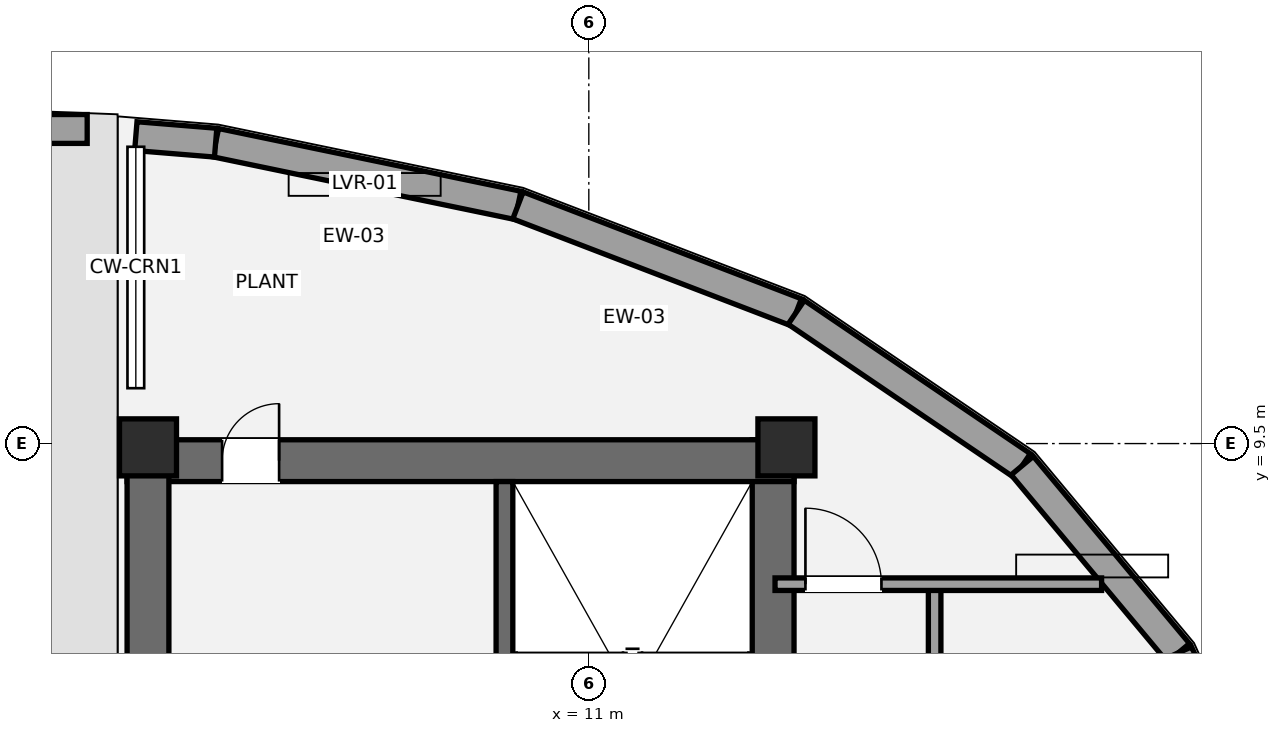
"""IFC4 building model, lengths in metres.
Left out: names, types, materials, properties, quantities, classifications, styles, units other than length and angle.
Written with IfcOpenShell. Run it as: python <this file> out.ifc"""

import sys

from ifc_helpers import new_model, si_unit, direction, frame, frame_2d, origin, origin_2d, place, context, subcontext, project, spatial, rectangle, extrude, element, fill, save


model = new_model("IFC4")
c1 = context("Model", 3, precision=1e-05, world=origin(), true_north=direction((0.0, 1.0)))
c2 = subcontext(c1, "Body", "Model", "MODEL_VIEW")
j1 = project(units=[si_unit("LENGTHUNIT", "METRE"), si_unit("PLANEANGLEUNIT", "RADIAN")], contexts=[c1])
p1 = place(None, origin())
s1 = spatial("IfcSite", under=j1, at=p1, CompositionType="ELEMENT")
p2 = place(p1, origin())
s2 = spatial("IfcBuilding", under=s1, at=p2, CompositionType="ELEMENT")
p3 = place(p2, frame((0.0, 0.0, 269.2)))
s3 = spatial("IfcBuildingStorey", under=s2, at=p3, CompositionType="ELEMENT", Elevation=269.2)
p4 = place(p3, frame((13.425, 1.3, 0.0), z_axis=(0.0, 0.0, 1.0), x_axis=(0.0, 1.0, 0.0)))
e1 = element("IfcWall", 1, at=p4, inside=s3, PredefinedType="SHEAR", context=c2, shape_type="SweptSolid", body=[
    extrude(rectangle(XDim=8.25, YDim=0.55, at=frame_2d((4.125, 0.0))), origin(), (0.0, 0.0, 1.0), 3.8),
])
p5 = place(p3, frame((4.925, 9.275, 0.0), z_axis=(0.0, 0.0, 1.0), x_axis=(1.0, 0.0, 0.0)))
e2 = element("IfcWall", 2, at=p5, inside=s3, PredefinedType="SHEAR", context=c2, shape_type="SweptSolid", body=[
    extrude(rectangle(XDim=8.775, YDim=0.55, at=frame_2d((4.387, 0.0))), origin(), (0.0, 0.0, 1.0), 3.8),
])
p6 = place(p5, frame((1.25, 0.0, 0.0)))
e3 = element("IfcOpeningElement", 3, at=p6, cuts=e2, PredefinedType="OPENING", context=c2, shape_type="SweptSolid", body=[
    extrude(rectangle(XDim=0.75, YDim=2.1, at=frame_2d((0.375, 1.05))), frame((0.0, 0.285, 0.0), z_axis=(0.0, -1.0, 0.0), x_axis=(1.0, 0.0, 0.0)), (0.0, 0.0, 1.0), 0.57),
])
p7 = place(p3, frame((5.2, 1.3, 0.0), z_axis=(0.0, 0.0, 1.0), x_axis=(0.0, 1.0, 0.0)))
e4 = element("IfcWall", 4, at=p7, inside=s3, PredefinedType="SHEAR", context=c2, shape_type="SweptSolid", body=[
    extrude(rectangle(XDim=8.25, YDim=0.55, at=frame_2d((4.125, 0.0))), origin(), (0.0, 0.0, 1.0), 3.8),
])
p8 = place(p3, frame((9.89, 1.85, 0.0), z_axis=(0.0, 0.0, 1.0), x_axis=(0.0, 1.0, 0.0)))
e5 = element("IfcWall", 5, at=p8, inside=s3, PredefinedType="SHEAR", context=c2, shape_type="SweptSolid", body=[
    extrude(rectangle(XDim=7.15, YDim=0.22, at=frame_2d((3.575, 0.0))), origin(), (0.0, 0.0, 1.0), 3.8),
])
for number, where, z_axis, x_axis in (
    (6, (5.2, 9.45, 0.0), (0.0, 0.0, 1.0), (1.0, 0.0, 0.0)),
    (7, (13.6, 9.45, 0.0), (0.0, 0.0, 1.0), (1.0, 0.0, 0.0)),
):
    element("IfcColumn", number, at=place(p3, frame(where, z_axis=z_axis, x_axis=x_axis)), inside=s3, PredefinedType="PILASTER", context=c2, shape_type="SweptSolid", body=[
        extrude(rectangle(XDim=0.75, YDim=0.75, at=origin_2d()), origin(), (0.0, 0.0, 1.0), 3.8),
    ])
p9 = place(p3, frame((10.068, 12.634, 0.0), z_axis=(0.0, 0.0, 1.0), x_axis=(-0.97915503901, 0.203114277148, 0.0)))
e8 = element("IfcWall", 8, at=p9, inside=s3, PredefinedType="ELEMENTEDWALL", context=c2, shape_type="SweptSolid", body=[
    extrude(rectangle(XDim=4.063, YDim=0.38, at=frame_2d((2.031, 0.0))), origin(), (0.0, 0.0, 1.0), 2.97),
])
p10 = place(p3, frame((13.729, 11.227, 0.0), z_axis=(0.0, 0.0, 1.0), x_axis=(-0.933505951982, 0.358561902068, 0.0)))
e9 = element("IfcWall", 9, at=p10, inside=s3, PredefinedType="ELEMENTEDWALL", context=c2, shape_type="SweptSolid", body=[
    extrude(rectangle(XDim=3.922, YDim=0.38, at=frame_2d((1.961, 0.0))), origin(), (0.0, 0.0, 1.0), 2.97),
])
p11 = place(p3, frame((16.703, 9.21, 0.0), z_axis=(0.0, 0.0, 1.0), x_axis=(-0.827549057152, 0.56139340752, 0.0)))
e10 = element("IfcWall", 10, at=p11, inside=s3, PredefinedType="ELEMENTEDWALL", context=c2, shape_type="SweptSolid", body=[
    extrude(rectangle(XDim=3.593, YDim=0.38, at=frame_2d((1.796, 0.0))), origin(), (0.0, 0.0, 1.0), 2.97),
])
p12 = place(p3, frame((18.758, 6.748, 0.0), z_axis=(0.0, 0.0, 1.0), x_axis=(-0.640685893821, 0.76780309029, 0.0)))
e11 = element("IfcWall", 11, at=p12, inside=s3, PredefinedType="ELEMENTEDWALL", context=c2, shape_type="SweptSolid", body=[
    extrude(rectangle(XDim=3.207, YDim=0.38, at=frame_2d((1.604, 0.0))), origin(), (0.0, 0.0, 1.0), 2.97),
])
p13 = place(p3, frame((19.959, 4.083, 0.0), z_axis=(0.0, 0.0, 1.0), x_axis=(-0.411031522025, 0.911621131777, 0.0)))
e12 = element("IfcWall", 12, at=p13, inside=s3, PredefinedType="ELEMENTEDWALL", context=c2, shape_type="SweptSolid", body=[
    extrude(rectangle(XDim=2.922, YDim=0.38, at=frame_2d((1.461, 0.0))), origin(), (0.0, 0.0, 1.0), 2.97),
])
p14 = place(p3, frame((6.09, 13.459, 0.0), z_axis=(0.0, 0.0, 1.0), x_axis=(-0.99666772043, 0.081568713692, 0.0)))
e13 = element("IfcWall", 13, at=p14, inside=s3, PredefinedType="ELEMENTEDWALL", context=c2, shape_type="SweptSolid", body=[
    extrude(rectangle(XDim=1.053, YDim=0.38, at=frame_2d((0.527, 0.0))), origin(), (0.0, 0.0, 1.0), 2.97),
])
p15 = place(p3, frame((4.4, 13.639, 0.0), z_axis=(0.0, 0.0, 1.0), x_axis=(-1.0, 0.0, 0.0)))
e14 = element("IfcWall", 14, at=p15, inside=s3, PredefinedType="PARAPET", context=c2, shape_type="SweptSolid", body=[
    extrude(rectangle(XDim=8.8, YDim=0.38, at=frame_2d((4.4, 0.0))), origin(), (0.0, 0.0, 1.0), 1.15),
])
p16 = place(p3, frame((15.55, -7.05, 0.0), z_axis=(0.0, 0.0, 1.0), x_axis=(0.0, 1.0, 0.0)))
e15 = element("IfcWall", 15, at=p16, inside=s3, PredefinedType="PARTITIONING", context=c2, shape_type="SweptSolid", body=[
    extrude(rectangle(XDim=14.7, YDim=0.165, at=frame_2d((7.35, 0.0))), origin(), (0.0, 0.0, 1.0), 2.987),
])
p17 = place(p16, frame((3.04, 0.0, 0.0)))
e16 = element("IfcOpeningElement", 16, at=p17, cuts=e15, PredefinedType="OPENING", context=c2, shape_type="SweptSolid", body=[
    extrude(rectangle(XDim=1.0, YDim=2.15, at=frame_2d((0.5, 1.075))), frame((0.0, 0.093, 0.0), z_axis=(0.0, -1.0, 0.0), x_axis=(1.0, 0.0, 0.0)), (0.0, 0.0, 1.0), 0.185),
])
p18 = place(p16, frame((10.2, 0.0, 0.0)))
e17 = element("IfcOpeningElement", 17, at=p18, cuts=e15, PredefinedType="OPENING", context=c2, shape_type="SweptSolid", body=[
    extrude(rectangle(XDim=1.0, YDim=2.15, at=frame_2d((0.5, 1.075))), frame((0.0, 0.093, 0.0), z_axis=(0.0, -1.0, 0.0), x_axis=(1.0, 0.0, 0.0)), (0.0, 0.0, 1.0), 0.185),
])
p19 = place(p3, frame((13.45, 7.65, 0.0), z_axis=(0.0, 0.0, 1.0), x_axis=(1.0, 0.0, 0.0)))
e18 = element("IfcWall", 18, at=p19, inside=s3, PredefinedType="PARTITIONING", context=c2, shape_type="SweptSolid", body=[
    extrude(rectangle(XDim=4.297, YDim=0.165, at=frame_2d((2.148, 0.0))), origin(), (0.0, 0.0, 1.0), 2.968),
])
p20 = place(p19, frame((0.4, 0.0, 0.0)))
e19 = element("IfcOpeningElement", 19, at=p20, cuts=e18, PredefinedType="OPENING", context=c2, shape_type="SweptSolid", body=[
    extrude(rectangle(XDim=1.0, YDim=2.15, at=frame_2d((0.5, 1.075))), frame((0.0, 0.093, 0.0), z_axis=(0.0, -1.0, 0.0), x_axis=(1.0, 0.0, 0.0)), (0.0, 0.0, 1.0), 0.185),
])
p21 = place(p6, origin())
e20 = element("IfcDoor", 20, at=p21, inside=s3, OperationType="SINGLE_SWING_RIGHT", PredefinedType="DOOR", context=c2, shape_type="SweptSolid", body=[
    extrude(rectangle(XDim=0.75, YDim=2.1, at=frame_2d((0.375, 1.05))), frame((0.0, 0.025, 0.0), z_axis=(0.0, -1.0, 0.0), x_axis=(1.0, 0.0, 0.0)), (0.0, 0.0, 1.0), 0.05),
])
fill(e3, e20)
p22 = place(p20, origin())
e21 = element("IfcDoor", 21, at=p22, inside=s3, OperationType="SINGLE_SWING_LEFT", PredefinedType="DOOR", context=c2, shape_type="SweptSolid", body=[
    extrude(rectangle(XDim=1.0, YDim=2.15, at=frame_2d((0.5, 1.075))), frame((0.0, 0.025, 0.0), z_axis=(0.0, -1.0, 0.0), x_axis=(1.0, 0.0, 0.0)), (0.0, 0.0, 1.0), 0.05),
])
fill(e19, e21)
save(model, sys.argv[1])
